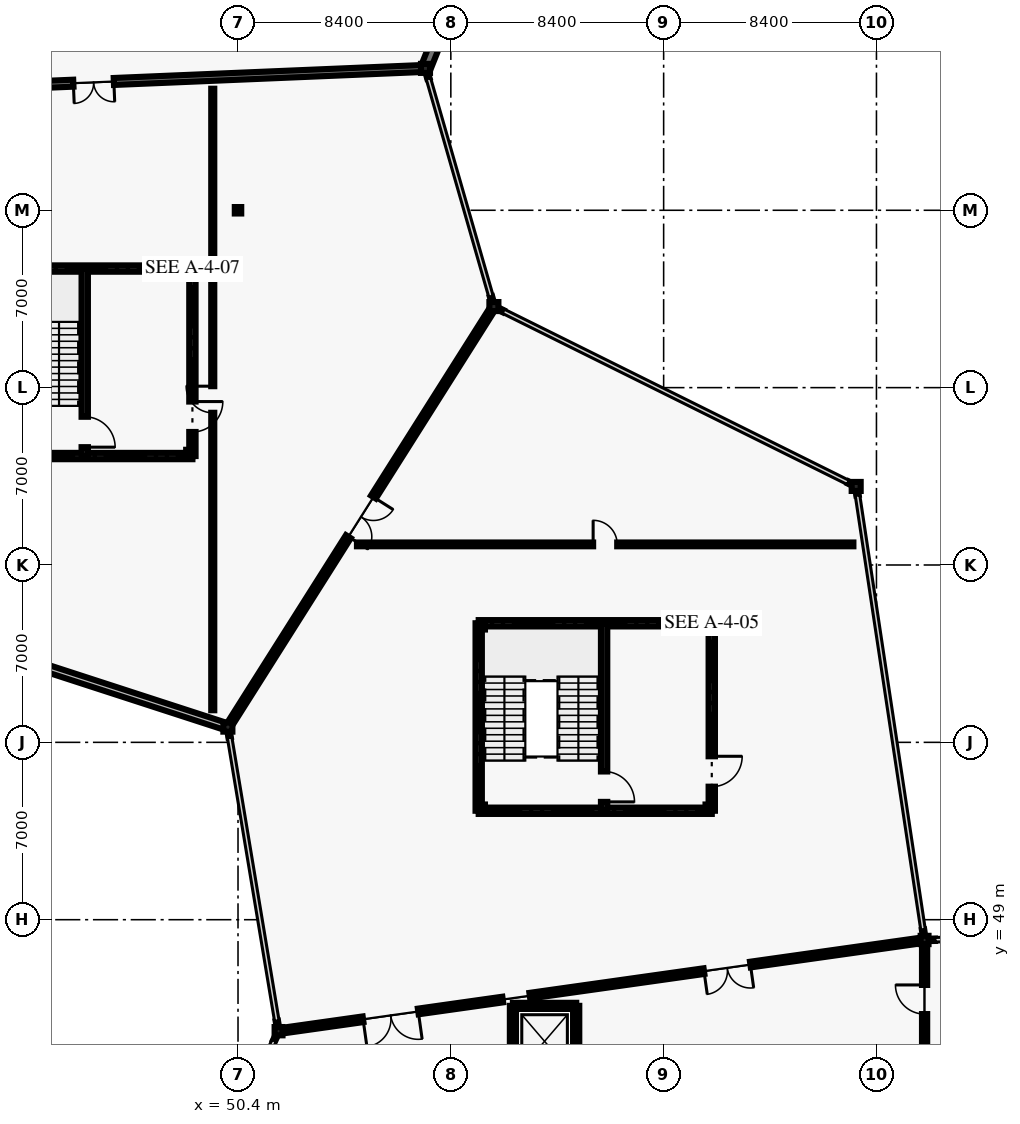
"""IFC4 building model, lengths in metres.
Left out: names, types, materials, properties, quantities, classifications, styles, units other than length and angle.
Written with IfcOpenShell. Run it as: python <this file> out.ifc"""

import sys

from ifc_helpers import new_model, si_unit, direction, frame, frame_2d, origin, origin_2d, place, context, subcontext, project, spatial, rectangle, hollow_circle, i_section, extrude, element, fill, save


model = new_model("IFC4")
c1 = context("Model", 3, precision=1e-05, world=origin(), true_north=direction((0.0, 1.0)))
c2 = subcontext(c1, "Body", "Model", "MODEL_VIEW")
j1 = project(units=[si_unit("LENGTHUNIT", "METRE"), si_unit("PLANEANGLEUNIT", "RADIAN")], contexts=[c1])
p1 = place(None, origin())
s1 = spatial("IfcSite", under=j1, at=p1, CompositionType="ELEMENT")
p2 = place(p1, origin())
s2 = spatial("IfcBuilding", under=s1, at=p2, CompositionType="ELEMENT")
p3 = place(p2, frame((0.0, 0.0, 10.2)))
s3 = spatial("IfcBuildingStorey", under=s2, at=p3, CompositionType="ELEMENT", Elevation=10.2)
p4 = place(p3, frame((50.0, 56.6, 0.0), z_axis=(0.0, 0.0, 1.0), x_axis=(1.0, 0.0, 0.0)))
e1 = element("IfcColumn", 1, at=p4, inside=s3, PredefinedType="COLUMN", context=c2, shape_type="SweptSolid", body=[
    extrude(hollow_circle(Radius=0.178, WallThickness=0.013, at=origin_2d()), origin(), (0.0, 0.0, 1.0), 4.8),
])
p5 = place(p3, frame((52.0, 44.6, 0.0), z_axis=(0.0, 0.0, 1.0), x_axis=(1.0, 0.0, 0.0)))
e2 = element("IfcColumn", 2, at=p5, inside=s3, PredefinedType="COLUMN", context=c2, shape_type="SweptSolid", body=[
    extrude(i_section(OverallWidth=0.311, OverallDepth=0.327, WebThickness=0.016, FlangeThickness=0.025, FilletRadius=0.017, at=origin_2d()), origin(), (0.0, 0.0, 1.0), 4.8),
])
for number, where, z_axis, x_axis in (
    (3, (57.8, 82.6, 0.0), (0.0, 0.0, 1.0), (1.0, 0.0, 0.0)),
    (4, (60.5, 73.2, 0.0), (0.0, 0.0, 1.0), (1.0, 0.0, 0.0)),
    (5, (74.8, 66.1, 0.0), (0.0, 0.0, 1.0), (1.0, 0.0, 0.0)),
):
    element("IfcColumn", number, at=place(p3, frame(where, z_axis=z_axis, x_axis=x_axis)), inside=s3, PredefinedType="COLUMN", context=c2, shape_type="SweptSolid", body=[
        extrude(hollow_circle(Radius=0.178, WallThickness=0.013, at=origin_2d()), origin(), (0.0, 0.0, 1.0), 4.8),
    ])
p6 = place(p3, frame((77.5, 48.2, 0.0), z_axis=(0.0, 0.0, 1.0), x_axis=(1.0, 0.0, 0.0)))
e6 = element("IfcColumn", 6, at=p6, inside=s3, PredefinedType="COLUMN", context=c2, shape_type="SweptSolid", body=[
    extrude(i_section(OverallWidth=0.311, OverallDepth=0.327, WebThickness=0.016, FlangeThickness=0.025, FilletRadius=0.017, at=origin_2d()), origin(), (0.0, 0.0, 1.0), 4.8),
])
for number, where, z_axis, x_axis in (
    (7, (50.4, 77.0, 0.0), (0.0, 0.0, 1.0), (1.0, 0.0, 0.0)),
    (8, (60.02, 53.42, 0.0), (0.0, 0.0, 1.0), (1.0, 0.0, 0.0)),
    (9, (68.98, 53.42, 0.0), (0.0, 0.0, 1.0), (1.0, 0.0, 0.0)),
    (10, (68.98, 60.58, 0.0), (0.0, 0.0, 1.0), (1.0, 0.0, 0.0)),
    (11, (60.02, 60.58, 0.0), (0.0, 0.0, 1.0), (1.0, 0.0, 0.0)),
    (12, (48.48, 67.42, 0.0), (0.0, 0.0, 1.0), (1.0, 0.0, 0.0)),
    (13, (48.48, 74.58, 0.0), (0.0, 0.0, 1.0), (1.0, 0.0, 0.0)),
):
    element("IfcColumn", number, at=place(p3, frame(where, z_axis=z_axis, x_axis=x_axis)), inside=s3, PredefinedType="COLUMN", context=c2, shape_type="SweptSolid", body=[
        extrude(i_section(OverallWidth=0.254, OverallDepth=0.254, WebThickness=0.009, FlangeThickness=0.014, FilletRadius=0.013, at=origin_2d()), origin(), (0.0, 0.0, 1.0), 4.8),
    ])
p7 = place(p3, frame((51.825, 44.229, 0.0), z_axis=(0.0, 0.0, 1.0), x_axis=(0.425224932958, 0.905087706463, 0.0)))
e14 = element("IfcWall", 14, at=p7, inside=s3, PredefinedType="SOLIDWALL", context=c2, shape_type="SweptSolid", body=[
    extrude(rectangle(XDim=0.308, YDim=0.095, at=frame_2d((0.154, 0.0))), origin(), (0.0, 0.0, 1.0), 3.62),
])
p8 = place(p3, frame((77.602, 48.202, 0.0), z_axis=(0.0, 0.0, 1.0), x_axis=(0.999735659566, 0.022991541735, 0.0)))
e15 = element("IfcWall", 15, at=p8, inside=s3, PredefinedType="SOLIDWALL", context=c2, shape_type="SweptSolid", body=[
    extrude(rectangle(XDim=0.308, YDim=0.095, at=frame_2d((0.154, 0.0))), origin(), (0.0, 0.0, 1.0), 3.62),
])
for number, where, z_axis, x_axis in (
    (16, (51.983, 44.7, 0.0), (0.0, 0.0, 1.0), (-0.166, 0.986, 0.0)),
    (17, (50.068, 56.196, 0.0), (0.0, 0.0, 1.0), (-0.166, 0.986, 0.0)),
):
    element("IfcWall", number, at=place(p3, frame(where, z_axis=z_axis, x_axis=x_axis)), inside=s3, PredefinedType="SOLIDWALL", context=c2, shape_type="SweptSolid", body=[
        extrude(rectangle(XDim=0.308, YDim=0.095, at=frame_2d((0.154, 0.0))), origin(), (0.0, 0.0, 1.0), 3.62),
    ])
p9 = place(p3, frame((74.806, 66.058, 0.0), z_axis=(0.0, 0.0, 1.0), x_axis=(0.14996991646, -0.988690560366, 0.0)))
e18 = element("IfcWall", 18, at=p9, inside=s3, PredefinedType="SOLIDWALL", context=c2, shape_type="SweptSolid", body=[
    extrude(rectangle(XDim=0.308, YDim=0.095, at=frame_2d((0.154, 0.0))), origin(), (0.0, 0.0, 1.0), 3.62),
])
p10 = place(p3, frame((77.439, 48.605, 0.0), z_axis=(0.0, 0.0, 1.0), x_axis=(0.15008766182, -0.988672692942, 0.0)))
e19 = element("IfcWall", 19, at=p10, inside=s3, PredefinedType="SOLIDWALL", context=c2, shape_type="SweptSolid", body=[
    extrude(rectangle(XDim=0.307, YDim=0.095, at=frame_2d((0.154, 0.0))), origin(), (0.0, 0.0, 1.0), 3.62),
])
for number, where, z_axis, x_axis in (
    (20, (60.592, 73.154, 0.0), (0.0, 0.0, 1.0), (0.895, -0.446, 0.0)),
    (21, (74.487, 66.256, 0.0), (0.0, 0.0, 1.0), (0.895, -0.447, 0.0)),
):
    element("IfcWall", number, at=place(p3, frame(where, z_axis=z_axis, x_axis=x_axis)), inside=s3, PredefinedType="SOLIDWALL", context=c2, shape_type="SweptSolid", body=[
        extrude(rectangle(XDim=0.307, YDim=0.095, at=frame_2d((0.154, 0.0))), origin(), (0.0, 0.0, 1.0), 3.62),
    ])
for number, where, z_axis, x_axis in (
    (22, (57.829, 82.502, 0.0), (0.0, 0.0, 1.0), (0.276, -0.961, 0.0)),
    (23, (60.386, 73.594, 0.0), (0.0, 0.0, 1.0), (0.276, -0.961, 0.0)),
):
    element("IfcWall", number, at=place(p3, frame(where, z_axis=z_axis, x_axis=x_axis)), inside=s3, PredefinedType="SOLIDWALL", context=c2, shape_type="SweptSolid", body=[
        extrude(rectangle(XDim=0.308, YDim=0.095, at=frame_2d((0.154, 0.0))), origin(), (0.0, 0.0, 1.0), 3.62),
    ])
p11 = place(p3, frame((49.943, 56.619, 0.0), z_axis=(0.0, 0.0, 1.0), x_axis=(-0.951074357174, 0.308962080402, 0.0)))
e24 = element("IfcWall", 24, at=p11, inside=s3, PredefinedType="SOLIDWALL", context=c2, shape_type="SweptSolid", body=[
    extrude(rectangle(XDim=24.8, YDim=0.29, at=frame_2d((12.4, 0.0))), origin(), (0.0, 0.0, 1.0), 3.62),
])
p12 = place(p3, frame((62.4, 94.1, 0.0), z_axis=(0.0, 0.0, 1.0), x_axis=(-0.371407751599, -0.928469860605, 0.0)))
e25 = element("IfcWall", 25, at=p12, inside=s3, PredefinedType="SOLIDWALL", context=c2, shape_type="SweptSolid", body=[
    extrude(rectangle(XDim=12.326, YDim=0.4, at=frame_2d((6.163, 0.0))), origin(), (0.0, 0.0, 1.0), 3.62),
])
p13 = place(p3, frame((77.5, 43.5, 0.0), z_axis=(0.0, 0.0, 1.0), x_axis=(0.0, 1.0, 0.0)))
e26 = element("IfcWall", 26, at=p13, inside=s3, PredefinedType="SOLIDWALL", context=c2, shape_type="SweptSolid", body=[
    extrude(rectangle(XDim=4.7, YDim=0.205, at=frame_2d((2.35, 0.0))), origin(), (0.0, 0.0, 1.0), 3.32),
])
p14 = place(p13, frame((1.775, 0.0, 0.0)))
e27 = element("IfcOpeningElement", 27, at=p14, cuts=e26, PredefinedType="OPENING", context=c2, shape_type="SweptSolid", body=[
    extrude(rectangle(XDim=1.15, YDim=2.2, at=frame_2d((0.575, 1.1))), frame((0.0, 0.113, 0.0), z_axis=(0.0, -1.0, 0.0), x_axis=(1.0, 0.0, 0.0)), (0.0, 0.0, 1.0), 0.225),
])
p15 = place(p3, frame((77.5, 48.2, 0.0), z_axis=(0.0, 0.0, 1.0), x_axis=(-0.990181159322, -0.139790098807, 0.0)))
e28 = element("IfcWall", 28, at=p15, inside=s3, PredefinedType="SOLIDWALL", context=c2, shape_type="SweptSolid", body=[
    extrude(rectangle(XDim=15.738, YDim=0.225, at=frame_2d((7.869, 0.0))), origin(), (0.0, 0.0, 1.0), 4.02),
])
p16 = place(p15, frame((6.944, 0.0, 0.0)))
e29 = element("IfcOpeningElement", 29, at=p16, cuts=e28, PredefinedType="OPENING", context=c2, shape_type="SweptSolid", body=[
    extrude(rectangle(XDim=1.85, YDim=2.4, at=frame_2d((0.925, 1.2))), frame((0.0, 0.123, 0.0), z_axis=(0.0, -1.0, 0.0), x_axis=(1.0, 0.0, 0.0)), (0.0, 0.0, 1.0), 0.245),
])
p17 = place(p3, frame((60.85, 45.849, 0.0), z_axis=(0.0, 0.0, 1.0), x_axis=(-0.990187360524, -0.139746166523, 0.0)))
e30 = element("IfcWall", 30, at=p17, inside=s3, PredefinedType="SOLIDWALL", context=c2, shape_type="SweptSolid", body=[
    extrude(rectangle(XDim=8.938, YDim=0.225, at=frame_2d((4.469, 0.0))), origin(), (0.0, 0.0, 1.0), 4.02),
])
p18 = place(p17, frame((3.369, 0.0, 0.0)))
e31 = element("IfcOpeningElement", 31, at=p18, cuts=e30, PredefinedType="OPENING", context=c2, shape_type="SweptSolid", body=[
    extrude(rectangle(XDim=2.2, YDim=2.6, at=frame_2d((1.1, 1.3))), frame((0.0, 0.123, 0.0), z_axis=(0.0, -1.0, 0.0), x_axis=(1.0, 0.0, 0.0)), (0.0, 0.0, 1.0), 0.245),
])
p19 = place(p3, frame((60.5, 73.2, 0.0), z_axis=(0.0, 0.0, 1.0), x_axis=(-0.534570878454, -0.845123645338, 0.0)))
e32 = element("IfcWall", 32, at=p19, inside=s3, PredefinedType="SOLIDWALL", context=c2, shape_type="SweptSolid", body=[
    extrude(rectangle(XDim=19.642, YDim=0.225, at=frame_2d((9.821, 0.0))), origin(), (0.0, 0.0, 1.0), 4.02),
])
p20 = place(p19, frame((8.896, 0.0, 0.0)))
e33 = element("IfcOpeningElement", 33, at=p20, cuts=e32, PredefinedType="OPENING", context=c2, shape_type="SweptSolid", body=[
    extrude(rectangle(XDim=1.85, YDim=2.4, at=frame_2d((0.925, 1.2))), frame((0.0, 0.123, 0.0), z_axis=(0.0, -1.0, 0.0), x_axis=(1.0, 0.0, 0.0)), (0.0, 0.0, 1.0), 0.245),
])
p21 = place(p3, frame((57.8, 82.6, 0.0), z_axis=(0.0, 0.0, 1.0), x_axis=(-0.999119645224, -0.041951573605, 0.0)))
e34 = element("IfcWall", 34, at=p21, inside=s3, PredefinedType="SOLIDWALL", context=c2, shape_type="SweptSolid", body=[
    extrude(rectangle(XDim=26.223, YDim=0.275, at=frame_2d((13.112, 0.0))), origin(), (0.0, 0.0, 1.0), 4.02),
])
p22 = place(p21, frame((12.312, 0.0, 0.0)))
e35 = element("IfcOpeningElement", 35, at=p22, cuts=e34, PredefinedType="OPENING", context=c2, shape_type="SweptSolid", body=[
    extrude(rectangle(XDim=1.6, YDim=2.45, at=frame_2d((0.8, 1.225))), frame((0.0, 0.147, 0.0), z_axis=(0.0, -1.0, 0.0), x_axis=(1.0, 0.0, 0.0)), (0.0, 0.0, 1.0), 0.295),
])
p23 = place(p3, frame((55.095, 63.813, 0.0), z_axis=(0.0, 0.0, 1.0), x_axis=(1.0, 0.0, 0.0)))
e36 = element("IfcWall", 36, at=p23, inside=s3, PredefinedType="PARTITIONING", context=c2, shape_type="SweptSolid", body=[
    extrude(rectangle(XDim=19.595, YDim=0.15, at=frame_2d((9.797, 0.0))), origin(), (0.0, 0.0, 1.0), 3.32),
])
p24 = place(p23, frame((9.322, 0.0, 0.0)))
e37 = element("IfcOpeningElement", 37, at=p24, cuts=e36, PredefinedType="OPENING", context=c2, shape_type="SweptSolid", body=[
    extrude(rectangle(XDim=0.95, YDim=2.15, at=frame_2d((0.475, 1.075))), frame((0.0, 0.085, 0.0), z_axis=(0.0, -1.0, 0.0), x_axis=(1.0, 0.0, 0.0)), (0.0, 0.0, 1.0), 0.17),
])
p25 = place(p3, frame((49.403, 57.267, 0.0), z_axis=(0.0, 0.0, 1.0), x_axis=(0.0, 1.0, 0.0)))
e38 = element("IfcWall", 38, at=p25, inside=s3, PredefinedType="PARTITIONING", context=c2, shape_type="SweptSolid", body=[
    extrude(rectangle(XDim=24.53, YDim=0.12, at=frame_2d((12.265, 0.0))), origin(), (0.0, 0.0, 1.0), 3.32),
])
p26 = place(p25, frame((11.74, 0.0, 0.0)))
e39 = element("IfcOpeningElement", 39, at=p26, cuts=e38, PredefinedType="OPENING", context=c2, shape_type="SweptSolid", body=[
    extrude(rectangle(XDim=1.05, YDim=2.2, at=frame_2d((0.525, 1.1))), frame((0.0, 0.07, 0.0), z_axis=(0.0, -1.0, 0.0), x_axis=(1.0, 0.0, 0.0)), (0.0, 0.0, 1.0), 0.14),
])
p27 = place(p3, frame((59.9, 53.3, 0.0), z_axis=(0.0, 0.0, 1.0), x_axis=(0.0, 1.0, 0.0)))
e40 = element("IfcWall", 40, at=p27, inside=s3, PredefinedType="SHEAR", context=c2, shape_type="SweptSolid", body=[
    extrude(rectangle(XDim=7.4, YDim=0.25, at=frame_2d((3.7, 0.0))), origin(), (0.0, 0.0, 1.0), 4.56),
])
for number, where, z_axis, x_axis in (
    (41, (59.9, 60.7, 0.0), (0.0, 0.0, 1.0), (1.0, 0.0, 0.0)),
    (42, (69.1, 53.3, 0.0), (0.0, 0.0, 1.0), (-1.0, 0.0, 0.0)),
):
    element("IfcWall", number, at=place(p3, frame(where, z_axis=z_axis, x_axis=x_axis)), inside=s3, PredefinedType="SHEAR", context=c2, shape_type="SweptSolid", body=[
        extrude(rectangle(XDim=9.2, YDim=0.25, at=frame_2d((4.6, 0.0))), origin(), (0.0, 0.0, 1.0), 4.56),
    ])
p28 = place(p3, frame((69.1, 60.7, 0.0), z_axis=(0.0, 0.0, 1.0), x_axis=(0.0, -1.0, 0.0)))
e43 = element("IfcWall", 43, at=p28, inside=s3, PredefinedType="SHEAR", context=c2, shape_type="SweptSolid", body=[
    extrude(rectangle(XDim=7.4, YDim=0.25, at=frame_2d((3.7, 0.0))), origin(), (0.0, 0.0, 1.0), 4.56),
])
p29 = place(p28, frame((5.25, 0.0, 0.0)))
e44 = element("IfcOpeningElement", 44, at=p29, cuts=e43, PredefinedType="OPENING", context=c2, shape_type="SweptSolid", body=[
    extrude(rectangle(XDim=1.2, YDim=2.2, at=frame_2d((0.6, 1.1))), frame((0.0, 0.135, 0.0), z_axis=(0.0, -1.0, 0.0), x_axis=(1.0, 0.0, 0.0)), (0.0, 0.0, 1.0), 0.27),
])
p30 = place(p3, frame((64.85, 60.7, 0.0), z_axis=(0.0, 0.0, 1.0), x_axis=(0.0, -1.0, 0.0)))
e45 = element("IfcWall", 45, at=p30, inside=s3, PredefinedType="SHEAR", context=c2, shape_type="SweptSolid", body=[
    extrude(rectangle(XDim=7.4, YDim=0.25, at=frame_2d((3.7, 0.0))), origin(), (0.0, 0.0, 1.0), 4.56),
])
p31 = place(p30, frame((5.85, 0.0, 0.0)))
e46 = element("IfcOpeningElement", 46, at=p31, cuts=e45, PredefinedType="OPENING", context=c2, shape_type="SweptSolid", body=[
    extrude(rectangle(XDim=1.2, YDim=2.2, at=frame_2d((0.6, 1.1))), frame((0.0, 0.135, 0.0), z_axis=(0.0, -1.0, 0.0), x_axis=(1.0, 0.0, 0.0)), (0.0, 0.0, 1.0), 0.27),
])
for number, where, z_axis, x_axis in (
    (47, (39.4, 74.7, 0.0), (0.0, 0.0, 1.0), (1.0, 0.0, 0.0)),
    (48, (48.6, 67.3, 0.0), (0.0, 0.0, 1.0), (-1.0, 0.0, 0.0)),
):
    element("IfcWall", number, at=place(p3, frame(where, z_axis=z_axis, x_axis=x_axis)), inside=s3, PredefinedType="SHEAR", context=c2, shape_type="SweptSolid", body=[
        extrude(rectangle(XDim=9.2, YDim=0.25, at=frame_2d((4.6, 0.0))), origin(), (0.0, 0.0, 1.0), 4.56),
    ])
p32 = place(p3, frame((48.6, 74.7, 0.0), z_axis=(0.0, 0.0, 1.0), x_axis=(0.0, -1.0, 0.0)))
e49 = element("IfcWall", 49, at=p32, inside=s3, PredefinedType="SHEAR", context=c2, shape_type="SweptSolid", body=[
    extrude(rectangle(XDim=7.4, YDim=0.25, at=frame_2d((3.7, 0.0))), origin(), (0.0, 0.0, 1.0), 4.56),
])
p33 = place(p32, frame((5.25, 0.0, 0.0)))
e50 = element("IfcOpeningElement", 50, at=p33, cuts=e49, PredefinedType="OPENING", context=c2, shape_type="SweptSolid", body=[
    extrude(rectangle(XDim=1.2, YDim=2.2, at=frame_2d((0.6, 1.1))), frame((0.0, 0.135, 0.0), z_axis=(0.0, -1.0, 0.0), x_axis=(1.0, 0.0, 0.0)), (0.0, 0.0, 1.0), 0.27),
])
p34 = place(p3, frame((44.35, 74.7, 0.0), z_axis=(0.0, 0.0, 1.0), x_axis=(0.0, -1.0, 0.0)))
e51 = element("IfcWall", 51, at=p34, inside=s3, PredefinedType="SHEAR", context=c2, shape_type="SweptSolid", body=[
    extrude(rectangle(XDim=7.4, YDim=0.25, at=frame_2d((3.7, 0.0))), origin(), (0.0, 0.0, 1.0), 4.56),
])
p35 = place(p34, frame((5.85, 0.0, 0.0)))
e52 = element("IfcOpeningElement", 52, at=p35, cuts=e51, PredefinedType="OPENING", context=c2, shape_type="SweptSolid", body=[
    extrude(rectangle(XDim=1.2, YDim=2.2, at=frame_2d((0.6, 1.1))), frame((0.0, 0.135, 0.0), z_axis=(0.0, -1.0, 0.0), x_axis=(1.0, 0.0, 0.0)), (0.0, 0.0, 1.0), 0.27),
])
p36 = place(p3, frame((61.25, 45.6, 0.0), z_axis=(0.0, 0.0, 1.0), x_axis=(1.0, 0.0, 0.0)))
e53 = element("IfcWall", 53, at=p36, inside=s3, PredefinedType="SHEAR", context=c2, shape_type="SweptSolid", body=[
    extrude(rectangle(XDim=2.5, YDim=0.24, at=frame_2d((1.25, 0.0))), origin(), (0.0, 0.0, 1.0), 4.56),
])
for number, where, z_axis, x_axis in (
    (54, (63.75, 45.6, 0.0), (0.0, 0.0, 1.0), (0.0, -1.0, 0.0)),
    (55, (61.25, 42.8, 0.0), (0.0, 0.0, 1.0), (0.0, 1.0, 0.0)),
):
    element("IfcWall", number, at=place(p3, frame(where, z_axis=z_axis, x_axis=x_axis)), inside=s3, PredefinedType="SHEAR", context=c2, shape_type="SweptSolid", body=[
        extrude(rectangle(XDim=2.8, YDim=0.24, at=frame_2d((1.4, 0.0))), origin(), (0.0, 0.0, 1.0), 4.56),
    ])
p37 = place(p14, origin())
e56 = element("IfcDoor", 56, at=p37, inside=s3, OperationType="SINGLE_SWING_RIGHT", PredefinedType="DOOR", context=c2, shape_type="SweptSolid", body=[
    extrude(rectangle(XDim=1.15, YDim=2.2, at=frame_2d((0.575, 1.1))), frame((0.0, 0.025, 0.0), z_axis=(0.0, -1.0, 0.0), x_axis=(1.0, 0.0, 0.0)), (0.0, 0.0, 1.0), 0.05),
])
fill(e27, e56)
p38 = place(p16, origin())
e57 = element("IfcDoor", 57, at=p38, inside=s3, OperationType="DOUBLE_DOOR_SINGLE_SWING", PredefinedType="DOOR", context=c2, shape_type="SweptSolid", body=[
    extrude(rectangle(XDim=1.85, YDim=2.4, at=frame_2d((0.925, 1.2))), frame((0.0, 0.025, 0.0), z_axis=(0.0, -1.0, 0.0), x_axis=(1.0, 0.0, 0.0)), (0.0, 0.0, 1.0), 0.05),
])
fill(e29, e57)
p39 = place(p18, origin())
e58 = element("IfcDoor", 58, at=p39, inside=s3, OperationType="DOUBLE_DOOR_SINGLE_SWING", PredefinedType="DOOR", context=c2, shape_type="SweptSolid", body=[
    extrude(rectangle(XDim=2.2, YDim=2.6, at=frame_2d((1.1, 1.3))), frame((0.0, 0.025, 0.0), z_axis=(0.0, -1.0, 0.0), x_axis=(1.0, 0.0, 0.0)), (0.0, 0.0, 1.0), 0.05),
])
fill(e31, e58)
p40 = place(p20, origin())
e59 = element("IfcDoor", 59, at=p40, inside=s3, OperationType="DOUBLE_DOOR_SINGLE_SWING", PredefinedType="DOOR", context=c2, shape_type="SweptSolid", body=[
    extrude(rectangle(XDim=1.85, YDim=2.4, at=frame_2d((0.925, 1.2))), frame((0.0, 0.025, 0.0), z_axis=(0.0, -1.0, 0.0), x_axis=(1.0, 0.0, 0.0)), (0.0, 0.0, 1.0), 0.05),
])
fill(e33, e59)
p41 = place(p22, origin())
e60 = element("IfcDoor", 60, at=p41, inside=s3, OperationType="DOUBLE_DOOR_SINGLE_SWING", PredefinedType="DOOR", context=c2, shape_type="SweptSolid", body=[
    extrude(rectangle(XDim=1.6, YDim=2.45, at=frame_2d((0.8, 1.225))), frame((0.0, 0.025, 0.0), z_axis=(0.0, -1.0, 0.0), x_axis=(1.0, 0.0, 0.0)), (0.0, 0.0, 1.0), 0.05),
])
fill(e35, e60)
p42 = place(p24, origin())
e61 = element("IfcDoor", 61, at=p42, inside=s3, OperationType="SINGLE_SWING_LEFT", PredefinedType="DOOR", context=c2, shape_type="SweptSolid", body=[
    extrude(rectangle(XDim=0.95, YDim=2.15, at=frame_2d((0.475, 1.075))), frame((0.0, 0.025, 0.0), z_axis=(0.0, -1.0, 0.0), x_axis=(1.0, 0.0, 0.0)), (0.0, 0.0, 1.0), 0.05),
])
fill(e37, e61)
p43 = place(p26, origin())
e62 = element("IfcDoor", 62, at=p43, inside=s3, OperationType="SINGLE_SWING_RIGHT", PredefinedType="DOOR", context=c2, shape_type="SweptSolid", body=[
    extrude(rectangle(XDim=1.05, YDim=2.2, at=frame_2d((0.525, 1.1))), frame((0.0, 0.025, 0.0), z_axis=(0.0, -1.0, 0.0), x_axis=(1.0, 0.0, 0.0)), (0.0, 0.0, 1.0), 0.05),
])
fill(e39, e62)
p44 = place(p29, origin())
e63 = element("IfcDoor", 63, at=p44, inside=s3, OperationType="SINGLE_SWING_LEFT", PredefinedType="DOOR", context=c2, shape_type="SweptSolid", body=[
    extrude(rectangle(XDim=1.2, YDim=2.2, at=frame_2d((0.6, 1.1))), frame((0.0, 0.025, 0.0), z_axis=(0.0, -1.0, 0.0), x_axis=(1.0, 0.0, 0.0)), (0.0, 0.0, 1.0), 0.05),
])
fill(e44, e63)
p45 = place(p31, origin())
e64 = element("IfcDoor", 64, at=p45, inside=s3, OperationType="SINGLE_SWING_RIGHT", PredefinedType="DOOR", context=c2, shape_type="SweptSolid", body=[
    extrude(rectangle(XDim=1.2, YDim=2.2, at=frame_2d((0.6, 1.1))), frame((0.0, 0.025, 0.0), z_axis=(0.0, -1.0, 0.0), x_axis=(1.0, 0.0, 0.0)), (0.0, 0.0, 1.0), 0.05),
])
fill(e46, e64)
p46 = place(p33, origin())
e65 = element("IfcDoor", 65, at=p46, inside=s3, OperationType="SINGLE_SWING_LEFT", PredefinedType="DOOR", context=c2, shape_type="SweptSolid", body=[
    extrude(rectangle(XDim=1.2, YDim=2.2, at=frame_2d((0.6, 1.1))), frame((0.0, 0.025, 0.0), z_axis=(0.0, -1.0, 0.0), x_axis=(1.0, 0.0, 0.0)), (0.0, 0.0, 1.0), 0.05),
])
fill(e50, e65)
p47 = place(p35, origin())
e66 = element("IfcDoor", 66, at=p47, inside=s3, OperationType="SINGLE_SWING_RIGHT", PredefinedType="DOOR", context=c2, shape_type="SweptSolid", body=[
    extrude(rectangle(XDim=1.2, YDim=2.2, at=frame_2d((0.6, 1.1))), frame((0.0, 0.025, 0.0), z_axis=(0.0, -1.0, 0.0), x_axis=(1.0, 0.0, 0.0)), (0.0, 0.0, 1.0), 0.05),
])
fill(e52, e66)
save(model, sys.argv[1])
